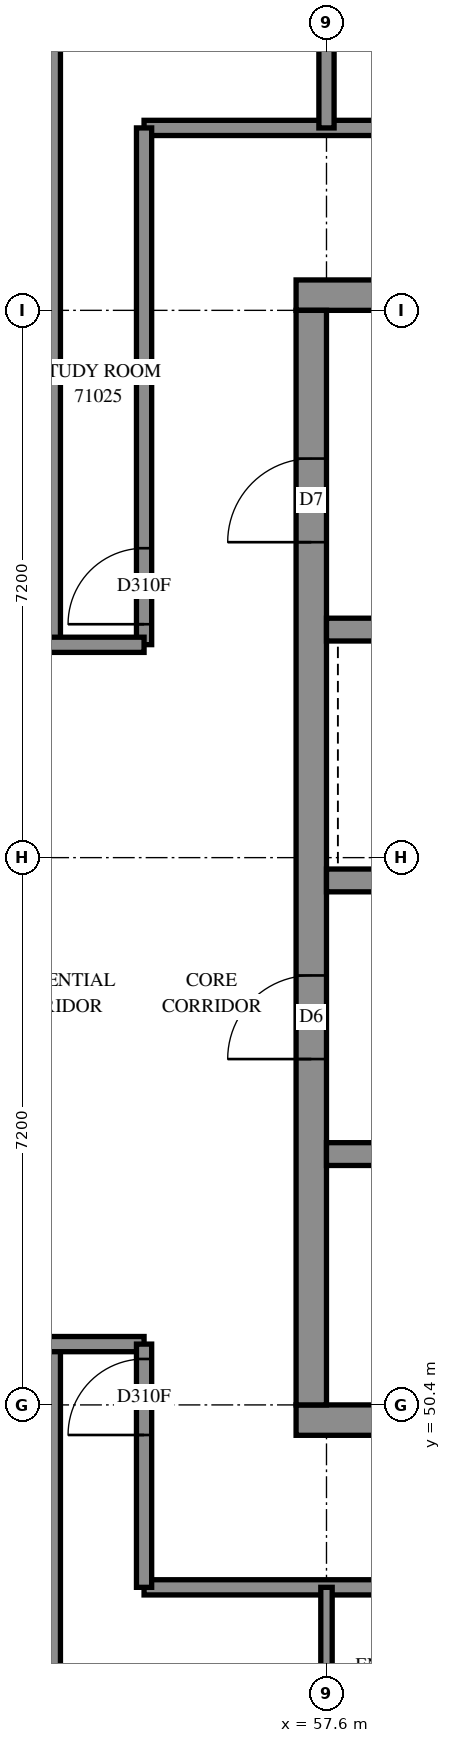
"""IFC4 building model, lengths in metres.
Left out: names, types, materials, properties, quantities, classifications, styles, units other than length and angle.
Written with IfcOpenShell. Run it as: python <this file> out.ifc"""

import sys

from ifc_helpers import new_model, si_unit, direction, frame, frame_2d, origin, place, context, subcontext, project, spatial, rectangle, extrude, element, fill, save


model = new_model("IFC4")
c1 = context("Model", 3, precision=1e-05, world=origin(), true_north=direction((0.0, 1.0)))
c2 = subcontext(c1, "Body", "Model", "MODEL_VIEW")
j1 = project(units=[si_unit("LENGTHUNIT", "METRE"), si_unit("PLANEANGLEUNIT", "RADIAN")], contexts=[c1])
p1 = place(None, origin())
s1 = spatial("IfcSite", under=j1, at=p1, CompositionType="ELEMENT")
p2 = place(p1, origin())
s2 = spatial("IfcBuilding", under=s1, at=p2, CompositionType="ELEMENT")
p3 = place(p2, frame((0.0, 0.0, 260.8)))
s3 = spatial("IfcBuildingStorey", under=s2, at=p3, CompositionType="ELEMENT", Elevation=260.8)
p4 = place(p3, frame((57.2, 50.2, -0.3), z_axis=(0.0, 0.0, 1.0), x_axis=(1.0, 0.0, 0.0)))
e1 = element("IfcWall", 1, at=p4, inside=s3, PredefinedType="SHEAR", context=c2, shape_type="SweptSolid", body=[
    extrude(rectangle(XDim=15.2, YDim=0.4, at=frame_2d((7.6, 0.0))), origin(), (0.0, 0.0, 1.0), 2.7),
])
p5 = place(p3, frame((57.2, 65.0, -0.3), z_axis=(0.0, 0.0, 1.0), x_axis=(1.0, 0.0, 0.0)))
e2 = element("IfcWall", 2, at=p5, inside=s3, PredefinedType="SHEAR", context=c2, shape_type="SweptSolid", body=[
    extrude(rectangle(XDim=15.2, YDim=0.4, at=frame_2d((7.6, 0.0))), origin(), (0.0, 0.0, 1.0), 2.7),
])
p6 = place(p5, frame((10.4, 0.0, 0.3)))
e3 = element("IfcOpeningElement", 3, at=p6, cuts=e2, PredefinedType="OPENING", context=c2, shape_type="SweptSolid", body=[
    extrude(rectangle(XDim=0.8, YDim=2.1, at=frame_2d((0.4, 1.05))), frame((0.0, 0.21, 0.0), z_axis=(0.0, -1.0, 0.0), x_axis=(1.0, 0.0, 0.0)), (0.0, 0.0, 1.0), 0.42),
])
p7 = place(p3, frame((57.4, 50.4, -0.3), z_axis=(0.0, 0.0, 1.0), x_axis=(0.0, 1.0, 0.0)))
e4 = element("IfcWall", 4, at=p7, inside=s3, PredefinedType="SHEAR", context=c2, shape_type="SweptSolid", body=[
    extrude(rectangle(XDim=14.4, YDim=0.4, at=frame_2d((7.2, 0.0))), origin(), (0.0, 0.0, 1.0), 2.7),
])
p8 = place(p7, frame((4.55, 0.0, 0.3)))
e5 = element("IfcOpeningElement", 5, at=p8, cuts=e4, PredefinedType="OPENING", context=c2, shape_type="SweptSolid", body=[
    extrude(rectangle(XDim=1.1, YDim=2.1, at=frame_2d((0.55, 1.05))), frame((0.0, 0.21, 0.0), z_axis=(0.0, -1.0, 0.0), x_axis=(1.0, 0.0, 0.0)), (0.0, 0.0, 1.0), 0.42),
])
p9 = place(p7, frame((11.35, 0.0, 0.3)))
e6 = element("IfcOpeningElement", 6, at=p9, cuts=e4, PredefinedType="OPENING", context=c2, shape_type="SweptSolid", body=[
    extrude(rectangle(XDim=1.1, YDim=2.1, at=frame_2d((0.55, 1.05))), frame((0.0, 0.21, 0.0), z_axis=(0.0, -1.0, 0.0), x_axis=(1.0, 0.0, 0.0)), (0.0, 0.0, 1.0), 0.42),
])
p10 = place(p3, frame((57.6, 53.7, 0.0), z_axis=(0.0, 0.0, 1.0), x_axis=(1.0, 0.0, 0.0)))
e7 = element("IfcWall", 7, at=p10, inside=s3, PredefinedType="SOLIDWALL", context=c2, shape_type="SweptSolid", body=[
    extrude(rectangle(XDim=14.4, YDim=0.3, at=frame_2d((7.2, 0.0))), origin(), (0.0, 0.0, 1.0), 3.1),
])
p11 = place(p10, frame((1.35, 0.0, 0.0)))
e8 = element("IfcOpeningElement", 8, at=p11, cuts=e7, PredefinedType="OPENING", context=c2, shape_type="SweptSolid", body=[
    extrude(rectangle(XDim=0.9, YDim=2.1, at=frame_2d((0.45, 1.05))), frame((0.0, 0.16, 0.0), z_axis=(0.0, -1.0, 0.0), x_axis=(1.0, 0.0, 0.0)), (0.0, 0.0, 1.0), 0.32),
])
p12 = place(p10, frame((4.95, 0.0, 0.0)))
e9 = element("IfcOpeningElement", 9, at=p12, cuts=e7, PredefinedType="OPENING", context=c2, shape_type="SweptSolid", body=[
    extrude(rectangle(XDim=0.9, YDim=2.1, at=frame_2d((0.45, 1.05))), frame((0.0, 0.16, 0.0), z_axis=(0.0, -1.0, 0.0), x_axis=(1.0, 0.0, 0.0)), (0.0, 0.0, 1.0), 0.32),
])
p13 = place(p10, frame((8.55, 0.0, 0.0)))
e10 = element("IfcOpeningElement", 10, at=p13, cuts=e7, PredefinedType="OPENING", context=c2, shape_type="SweptSolid", body=[
    extrude(rectangle(XDim=0.9, YDim=2.1, at=frame_2d((0.45, 1.05))), frame((0.0, 0.16, 0.0), z_axis=(0.0, -1.0, 0.0), x_axis=(1.0, 0.0, 0.0)), (0.0, 0.0, 1.0), 0.32),
])
p14 = place(p10, frame((12.05, 0.0, 0.0)))
e11 = element("IfcOpeningElement", 11, at=p14, cuts=e7, PredefinedType="OPENING", context=c2, shape_type="SweptSolid", body=[
    extrude(rectangle(XDim=1.1, YDim=2.1, at=frame_2d((0.55, 1.05))), frame((0.0, 0.16, 0.0), z_axis=(0.0, -1.0, 0.0), x_axis=(1.0, 0.0, 0.0)), (0.0, 0.0, 1.0), 0.32),
])
p15 = place(p3, frame((57.6, 57.3, 0.0), z_axis=(0.0, 0.0, 1.0), x_axis=(1.0, 0.0, 0.0)))
e12 = element("IfcWall", 12, at=p15, inside=s3, PredefinedType="SOLIDWALL", context=c2, shape_type="SweptSolid", body=[
    extrude(rectangle(XDim=14.4, YDim=0.3, at=frame_2d((7.2, 0.0))), origin(), (0.0, 0.0, 1.0), 3.1),
])
p16 = place(p15, frame((8.55, 0.0, 0.0)))
e13 = element("IfcOpeningElement", 13, at=p16, cuts=e12, PredefinedType="OPENING", context=c2, shape_type="SweptSolid", body=[
    extrude(rectangle(XDim=0.9, YDim=2.1, at=frame_2d((0.45, 1.05))), frame((0.0, 0.16, 0.0), z_axis=(0.0, -1.0, 0.0), x_axis=(1.0, 0.0, 0.0)), (0.0, 0.0, 1.0), 0.32),
])
p17 = place(p15, frame((1.25, 0.0, 0.0)))
e14 = element("IfcOpeningElement", 14, at=p17, cuts=e12, PredefinedType="OPENING", context=c2, shape_type="SweptSolid", body=[
    extrude(rectangle(XDim=1.1, YDim=2.1, at=frame_2d((0.55, 1.05))), frame((0.0, 0.16, 0.0), z_axis=(0.0, -1.0, 0.0), x_axis=(1.0, 0.0, 0.0)), (0.0, 0.0, 1.0), 0.32),
])
p18 = place(p15, frame((4.85, 0.0, 0.0)))
e15 = element("IfcOpeningElement", 15, at=p18, cuts=e12, PredefinedType="OPENING", context=c2, shape_type="SweptSolid", body=[
    extrude(rectangle(XDim=1.1, YDim=2.1, at=frame_2d((0.55, 1.05))), frame((0.0, 0.16, 0.0), z_axis=(0.0, -1.0, 0.0), x_axis=(1.0, 0.0, 0.0)), (0.0, 0.0, 1.0), 0.32),
])
p19 = place(p15, frame((12.05, 0.0, 0.0)))
e16 = element("IfcOpeningElement", 16, at=p19, cuts=e12, PredefinedType="OPENING", context=c2, shape_type="SweptSolid", body=[
    extrude(rectangle(XDim=1.1, YDim=2.1, at=frame_2d((0.55, 1.05))), frame((0.0, 0.16, 0.0), z_axis=(0.0, -1.0, 0.0), x_axis=(1.0, 0.0, 0.0)), (0.0, 0.0, 1.0), 0.32),
])
p20 = place(p3, frame((57.6, 60.6, 0.0), z_axis=(0.0, 0.0, 1.0), x_axis=(1.0, 0.0, 0.0)))
e17 = element("IfcWall", 17, at=p20, inside=s3, PredefinedType="SOLIDWALL", context=c2, shape_type="SweptSolid", body=[
    extrude(rectangle(XDim=7.2, YDim=0.3, at=frame_2d((3.6, 0.0))), origin(), (0.0, 0.0, 1.0), 3.1),
])
p21 = place(p3, frame((55.2, 67.2, 0.0), z_axis=(0.0, 0.0, 1.0), x_axis=(1.0, 0.0, 0.0)))
e18 = element("IfcWall", 18, at=p21, inside=s3, PredefinedType="PARTITIONING", context=c2, shape_type="SweptSolid", body=[
    extrude(rectangle(XDim=19.2, YDim=0.2, at=frame_2d((9.6, 0.0))), origin(), (0.0, 0.0, 1.0), 3.1),
])
p22 = place(p21, frame((4.475, 0.0, 0.0)))
e19 = element("IfcOpeningElement", 19, at=p22, cuts=e18, PredefinedType="OPENING", context=c2, shape_type="SweptSolid", body=[
    extrude(rectangle(XDim=1.0, YDim=2.1, at=frame_2d((0.5, 1.05))), frame((0.0, 0.11, 0.0), z_axis=(0.0, -1.0, 0.0), x_axis=(1.0, 0.0, 0.0)), (0.0, 0.0, 1.0), 0.22),
])
p23 = place(p21, frame((8.301, 0.0, 0.0)))
e20 = element("IfcOpeningElement", 20, at=p23, cuts=e18, PredefinedType="OPENING", context=c2, shape_type="SweptSolid", body=[
    extrude(rectangle(XDim=0.9, YDim=2.1, at=frame_2d((0.45, 1.05))), frame((0.0, 0.11, 0.0), z_axis=(0.0, -1.0, 0.0), x_axis=(1.0, 0.0, 0.0)), (0.0, 0.0, 1.0), 0.22),
])
p24 = place(p21, frame((13.88, 0.0, 0.0)))
e21 = element("IfcOpeningElement", 21, at=p24, cuts=e18, PredefinedType="OPENING", context=c2, shape_type="SweptSolid", body=[
    extrude(rectangle(XDim=1.0, YDim=2.1, at=frame_2d((0.5, 1.05))), frame((0.0, 0.11, 0.0), z_axis=(0.0, -1.0, 0.0), x_axis=(1.0, 0.0, 0.0)), (0.0, 0.0, 1.0), 0.22),
])
p25 = place(p3, frame((55.2, 48.0, 0.0), z_axis=(0.0, 0.0, 1.0), x_axis=(1.0, 0.0, 0.0)))
e22 = element("IfcWall", 22, at=p25, inside=s3, PredefinedType="PARTITIONING", context=c2, shape_type="SweptSolid", body=[
    extrude(rectangle(XDim=19.15, YDim=0.2, at=frame_2d((9.575, 0.0))), origin(), (0.0, 0.0, 1.0), 3.1),
])
p26 = place(p25, frame((6.343, 0.0, 0.0)))
e23 = element("IfcOpeningElement", 23, at=p26, cuts=e22, PredefinedType="OPENING", context=c2, shape_type="SweptSolid", body=[
    extrude(rectangle(XDim=0.9, YDim=2.1, at=frame_2d((0.45, 1.05))), frame((0.0, 0.11, 0.0), z_axis=(0.0, -1.0, 0.0), x_axis=(1.0, 0.0, 0.0)), (0.0, 0.0, 1.0), 0.22),
])
p27 = place(p25, frame((11.633, 0.0, 0.0)))
e24 = element("IfcOpeningElement", 24, at=p27, cuts=e22, PredefinedType="OPENING", context=c2, shape_type="SweptSolid", body=[
    extrude(rectangle(XDim=1.0, YDim=2.1, at=frame_2d((0.5, 1.05))), frame((0.0, 0.11, 0.0), z_axis=(0.0, -1.0, 0.0), x_axis=(1.0, 0.0, 0.0)), (0.0, 0.0, 1.0), 0.22),
])
p28 = place(p25, frame((13.707, 0.0, 0.0)))
e25 = element("IfcOpeningElement", 25, at=p28, cuts=e22, PredefinedType="OPENING", context=c2, shape_type="SweptSolid", body=[
    extrude(rectangle(XDim=1.0, YDim=2.1, at=frame_2d((0.5, 1.05))), frame((0.0, 0.11, 0.0), z_axis=(0.0, -1.0, 0.0), x_axis=(1.0, 0.0, 0.0)), (0.0, 0.0, 1.0), 0.22),
])
p29 = place(p3, frame((54.0, 60.4, 0.0), z_axis=(0.0, 0.0, 1.0), x_axis=(0.0, 1.0, 0.0)))
e26 = element("IfcWall", 26, at=p29, inside=s3, PredefinedType="PARTITIONING", context=c2, shape_type="SweptSolid", body=[
    extrude(rectangle(XDim=12.425, YDim=0.2, at=frame_2d((6.212, 0.0))), origin(), (0.0, 0.0, 1.0), 3.1),
])
p30 = place(p3, frame((54.0, 42.303, 0.0), z_axis=(0.0, 0.0, 1.0), x_axis=(0.0, 1.0, 0.0)))
e27 = element("IfcWall", 27, at=p30, inside=s3, PredefinedType="PARTITIONING", context=c2, shape_type="SweptSolid", body=[
    extrude(rectangle(XDim=8.897, YDim=0.2, at=frame_2d((4.448, 0.0))), origin(), (0.0, 0.0, 1.0), 3.1),
])
p31 = place(p3, frame((55.2, 60.402, 0.0), z_axis=(0.0, 0.0, 1.0), x_axis=(0.0, 1.0, 0.0)))
e28 = element("IfcWall", 28, at=p31, inside=s3, PredefinedType="PARTITIONING", context=c2, shape_type="SweptSolid", body=[
    extrude(rectangle(XDim=6.798, YDim=0.2, at=frame_2d((3.399, 0.0))), origin(), (0.0, 0.0, 1.0), 3.1),
])
p32 = place(p31, frame((0.269, 0.0, 0.0)))
e29 = element("IfcOpeningElement", 29, at=p32, cuts=e28, PredefinedType="OPENING", context=c2, shape_type="SweptSolid", body=[
    extrude(rectangle(XDim=1.0, YDim=2.1, at=frame_2d((0.5, 1.05))), frame((0.0, 0.11, 0.0), z_axis=(0.0, -1.0, 0.0), x_axis=(1.0, 0.0, 0.0)), (0.0, 0.0, 1.0), 0.22),
])
p33 = place(p3, frame((57.6, 67.2, 0.0), z_axis=(0.0, 0.0, 1.0), x_axis=(0.0, 1.0, 0.0)))
e30 = element("IfcWall", 30, at=p33, inside=s3, PredefinedType="PARTITIONING", context=c2, shape_type="SweptSolid", body=[
    extrude(rectangle(XDim=4.45, YDim=0.2, at=frame_2d((2.225, 0.0))), origin(), (0.0, 0.0, 1.0), 3.1),
])
p34 = place(p3, frame((50.85, 51.2, 0.0), z_axis=(0.0, 0.0, 1.0), x_axis=(1.0, 0.0, 0.0)))
e31 = element("IfcWall", 31, at=p34, inside=s3, PredefinedType="PARTITIONING", context=c2, shape_type="SweptSolid", body=[
    extrude(rectangle(XDim=4.35, YDim=0.2, at=frame_2d((2.175, 0.0))), origin(), (0.0, 0.0, 1.0), 3.1),
])
p35 = place(p34, frame((1.931, 0.0, 0.0)))
e32 = element("IfcOpeningElement", 32, at=p35, cuts=e31, PredefinedType="OPENING", context=c2, shape_type="SweptSolid", body=[
    extrude(rectangle(XDim=1.0, YDim=2.1, at=frame_2d((0.5, 1.05))), frame((0.0, 0.11, 0.0), z_axis=(0.0, -1.0, 0.0), x_axis=(1.0, 0.0, 0.0)), (0.0, 0.0, 1.0), 0.22),
])
p36 = place(p3, frame((50.85, 60.4, 0.0), z_axis=(0.0, 0.0, 1.0), x_axis=(1.0, 0.0, 0.0)))
e33 = element("IfcWall", 33, at=p36, inside=s3, PredefinedType="PARTITIONING", context=c2, shape_type="SweptSolid", body=[
    extrude(rectangle(XDim=4.35, YDim=0.2, at=frame_2d((2.175, 0.0))), origin(), (0.0, 0.0, 1.0), 3.1),
])
p37 = place(p36, frame((1.946, 0.0, 0.0)))
e34 = element("IfcOpeningElement", 34, at=p37, cuts=e33, PredefinedType="OPENING", context=c2, shape_type="SweptSolid", body=[
    extrude(rectangle(XDim=1.0, YDim=2.1, at=frame_2d((0.5, 1.05))), frame((0.0, 0.11, 0.0), z_axis=(0.0, -1.0, 0.0), x_axis=(1.0, 0.0, 0.0)), (0.0, 0.0, 1.0), 0.22),
])
p38 = place(p3, frame((55.2, 48.0, 0.0), z_axis=(0.0, 0.0, 1.0), x_axis=(0.0, 1.0, 0.0)))
e35 = element("IfcWall", 35, at=p38, inside=s3, PredefinedType="PARTITIONING", context=c2, shape_type="SweptSolid", body=[
    extrude(rectangle(XDim=3.2, YDim=0.2, at=frame_2d((1.6, 0.0))), origin(), (0.0, 0.0, 1.0), 3.1),
])
p39 = place(p38, frame((2.004, 0.0, 0.0)))
e36 = element("IfcOpeningElement", 36, at=p39, cuts=e35, PredefinedType="OPENING", context=c2, shape_type="SweptSolid", body=[
    extrude(rectangle(XDim=1.0, YDim=2.1, at=frame_2d((0.5, 1.05))), frame((0.0, 0.11, 0.0), z_axis=(0.0, -1.0, 0.0), x_axis=(1.0, 0.0, 0.0)), (0.0, 0.0, 1.0), 0.22),
])
p40 = place(p3, frame((57.6, 45.6, 0.0), z_axis=(0.0, 0.0, 1.0), x_axis=(0.0, 1.0, 0.0)))
e37 = element("IfcWall", 37, at=p40, inside=s3, PredefinedType="PARTITIONING", context=c2, shape_type="SweptSolid", body=[
    extrude(rectangle(XDim=2.4, YDim=0.15, at=frame_2d((1.2, 0.0))), origin(), (0.0, 0.0, 1.0), 3.1),
])
p41 = place(p8, origin())
e38 = element("IfcDoor", 38, at=p41, inside=s3, OperationType="DOUBLE_DOOR_SINGLE_SWING", PredefinedType="DOOR", context=c2, shape_type="SweptSolid", body=[
    extrude(rectangle(XDim=1.1, YDim=2.1, at=frame_2d((0.55, 1.05))), frame((0.0, 0.025, 0.0), z_axis=(0.0, -1.0, 0.0), x_axis=(1.0, 0.0, 0.0)), (0.0, 0.0, 1.0), 0.05),
])
fill(e5, e38)
p42 = place(p9, origin())
e39 = element("IfcDoor", 39, at=p42, inside=s3, OperationType="SINGLE_SWING_LEFT", PredefinedType="DOOR", context=c2, shape_type="SweptSolid", body=[
    extrude(rectangle(XDim=1.1, YDim=2.1, at=frame_2d((0.55, 1.05))), frame((0.0, 0.025, 0.0), z_axis=(0.0, -1.0, 0.0), x_axis=(1.0, 0.0, 0.0)), (0.0, 0.0, 1.0), 0.05),
])
fill(e6, e39)
p43 = place(p39, origin())
e40 = element("IfcDoor", 40, at=p43, inside=s3, OperationType="SINGLE_SWING_RIGHT", PredefinedType="DOOR", context=c2, shape_type="SweptSolid", body=[
    extrude(rectangle(XDim=1.0, YDim=2.1, at=frame_2d((0.5, 1.05))), frame((0.0, 0.025, 0.0), z_axis=(0.0, -1.0, 0.0), x_axis=(1.0, 0.0, 0.0)), (0.0, 0.0, 1.0), 0.05),
])
fill(e36, e40)
p44 = place(p32, origin())
e41 = element("IfcDoor", 41, at=p44, inside=s3, OperationType="SINGLE_SWING_LEFT", PredefinedType="DOOR", context=c2, shape_type="SweptSolid", body=[
    extrude(rectangle(XDim=1.0, YDim=2.1, at=frame_2d((0.5, 1.05))), frame((0.0, 0.025, 0.0), z_axis=(0.0, -1.0, 0.0), x_axis=(1.0, 0.0, 0.0)), (0.0, 0.0, 1.0), 0.05),
])
fill(e29, e41)
save(model, sys.argv[1])
